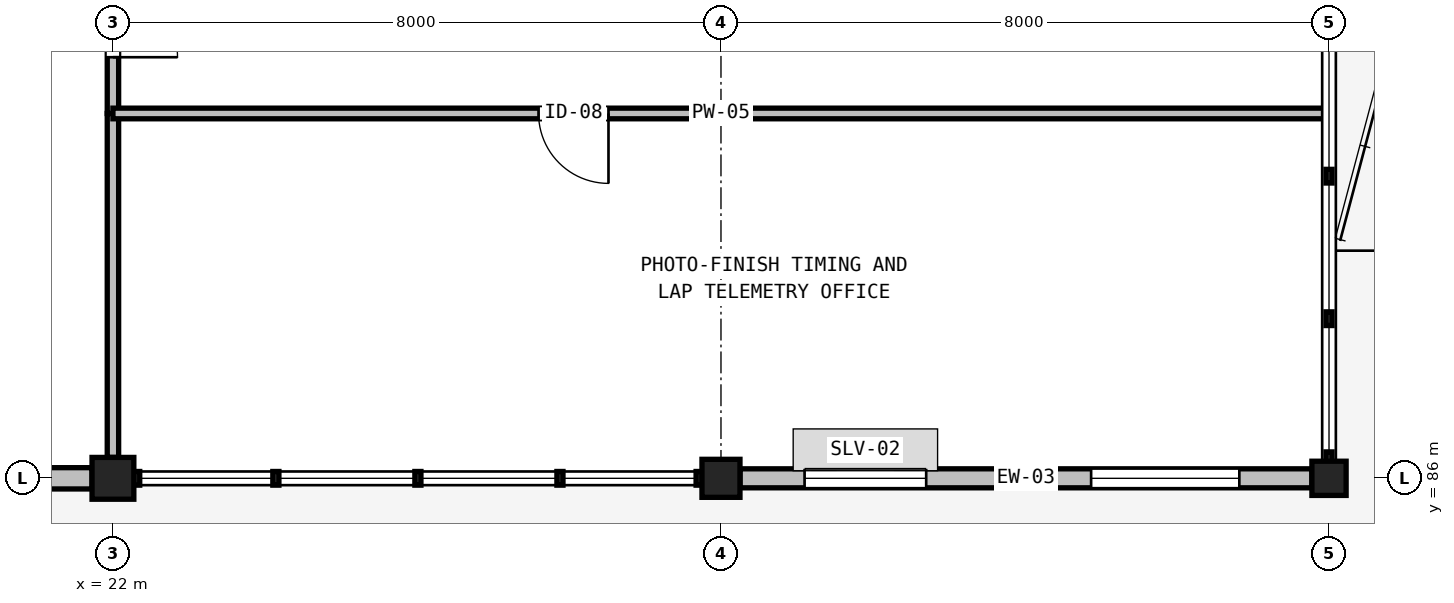
"""IFC4 building model, lengths in metres.
Left out: names, types, materials, properties, quantities, classifications, styles, units other than length and angle.
Written with IfcOpenShell. Run it as: python <this file> out.ifc"""

import sys

from ifc_helpers import new_model, si_unit, direction, frame, frame_2d, origin, origin_2d, place, context, subcontext, project, spatial, rectangle, extrude, element, fill, save


model = new_model("IFC4")
c1 = context("Model", 3, precision=1e-05, world=origin(), true_north=direction((0.0, 1.0)))
c2 = subcontext(c1, "Body", "Model", "MODEL_VIEW")
j1 = project(units=[si_unit("LENGTHUNIT", "METRE"), si_unit("PLANEANGLEUNIT", "RADIAN")], contexts=[c1])
p1 = place(None, origin())
s1 = spatial("IfcSite", under=j1, at=p1, CompositionType="ELEMENT")
p2 = place(p1, origin())
s2 = spatial("IfcBuilding", under=s1, at=p2, CompositionType="ELEMENT")
p3 = place(p2, frame((0.0, 0.0, 19.2)))
s3 = spatial("IfcBuildingStorey", under=s2, at=p3, CompositionType="ELEMENT", Elevation=19.2)
p4 = place(p3, frame((22.0, 86.0, 0.0), z_axis=(0.0, 0.0, 1.0), x_axis=(1.0, 0.0, 0.0)))
e1 = element("IfcColumn", 1, at=p4, inside=s3, PredefinedType="COLUMN", context=c2, shape_type="SweptSolid", body=[
    extrude(rectangle(XDim=0.55, YDim=0.55, at=origin_2d()), origin(), (0.0, 0.0, 1.0), 4.2),
])
p5 = place(p3, frame((30.0, 86.0, 0.0), z_axis=(0.0, 0.0, 1.0), x_axis=(1.0, 0.0, 0.0)))
e2 = element("IfcColumn", 2, at=p5, inside=s3, PredefinedType="COLUMN", context=c2, shape_type="SweptSolid", body=[
    extrude(rectangle(XDim=0.5, YDim=0.5, at=origin_2d()), origin(), (0.0, 0.0, 1.0), 4.2),
])
p6 = place(p3, frame((38.0, 86.0, 0.0), z_axis=(0.0, 0.0, 1.0), x_axis=(1.0, 0.0, 0.0)))
e3 = element("IfcColumn", 3, at=p6, inside=s3, PredefinedType="COLUMN", context=c2, shape_type="SweptSolid", body=[
    extrude(rectangle(XDim=0.45, YDim=0.45, at=origin_2d()), origin(), (0.0, 0.0, 1.0), 4.2),
])
p7 = place(p3, frame((14.225, 86.0, 0.0), z_axis=(0.0, 0.0, 1.0), x_axis=(1.0, 0.0, 0.0)))
e4 = element("IfcWall", 4, at=p7, inside=s3, PredefinedType="SOLIDWALL", context=c2, shape_type="SweptSolid", body=[
    extrude(rectangle(XDim=7.5, YDim=0.28, at=frame_2d((3.75, 0.0))), origin(), (0.0, 0.0, 1.0), 3.07),
])
p8 = place(p7, frame((1.35, 0.0, 1.15)))
e5 = element("IfcOpeningElement", 5, at=p8, cuts=e4, PredefinedType="OPENING", context=c2, shape_type="SweptSolid", body=[
    extrude(rectangle(XDim=4.8, YDim=1.4, at=frame_2d((2.4, 0.7))), frame((0.0, 0.15, 0.0), z_axis=(0.0, -1.0, 0.0), x_axis=(1.0, 0.0, 0.0)), (0.0, 0.0, 1.0), 0.3),
])
p9 = place(p3, frame((30.25, 86.0, 0.0), z_axis=(0.0, 0.0, 1.0), x_axis=(1.0, 0.0, 0.0)))
e6 = element("IfcWall", 6, at=p9, inside=s3, PredefinedType="SOLIDWALL", context=c2, shape_type="SweptSolid", body=[
    extrude(rectangle(XDim=7.525, YDim=0.25, at=frame_2d((3.762, 0.0))), origin(), (0.0, 0.0, 1.0), 3.37),
])
p10 = place(p9, frame((0.85, 0.0, 0.55)))
e7 = element("IfcOpeningElement", 7, at=p10, cuts=e6, PredefinedType="OPENING", context=c2, shape_type="SweptSolid", body=[
    extrude(rectangle(XDim=1.6, YDim=2.0, at=frame_2d((0.8, 1.0))), frame((0.0, 0.135, 0.0), z_axis=(0.0, -1.0, 0.0), x_axis=(1.0, 0.0, 0.0)), (0.0, 0.0, 1.0), 0.27),
])
p11 = place(p9, frame((4.62, 0.0, 0.7)))
e8 = element("IfcOpeningElement", 8, at=p11, cuts=e6, PredefinedType="OPENING", context=c2, shape_type="SweptSolid", body=[
    extrude(rectangle(XDim=1.95, YDim=1.85, at=frame_2d((0.975, 0.925))), frame((0.0, 0.135, 0.0), z_axis=(0.0, -1.0, 0.0), x_axis=(1.0, 0.0, 0.0)), (0.0, 0.0, 1.0), 0.27),
])
p12 = place(p3, frame((22.0, 86.275, 0.0), z_axis=(0.0, 0.0, 1.0), x_axis=(0.0, 1.0, 0.0)))
e9 = element("IfcWall", 9, at=p12, inside=s3, PredefinedType="PARTITIONING", context=c2, shape_type="SweptSolid", body=[
    extrude(rectangle(XDim=4.525, YDim=0.15, at=frame_2d((2.263, 0.0))), origin(), (0.0, 0.0, 1.0), 3.07),
])
p13 = place(p3, frame((22.0, 90.8, 0.0), z_axis=(0.0, 0.0, 1.0), x_axis=(0.0, 1.0, 0.0)))
e10 = element("IfcWall", 10, at=p13, inside=s3, PredefinedType="PARTITIONING", context=c2, shape_type="SweptSolid", body=[
    extrude(rectangle(XDim=2.95, YDim=0.15, at=frame_2d((1.475, 0.0))), origin(), (0.0, 0.0, 1.0), 3.07),
])
p14 = place(p13, frame((0.74, 0.0, 0.0)))
e11 = element("IfcOpeningElement", 11, at=p14, cuts=e10, PredefinedType="OPENING", context=c2, shape_type="SweptSolid", body=[
    extrude(rectangle(XDim=1.7, YDim=2.25, at=frame_2d((0.85, 1.125))), frame((0.0, 0.085, 0.0), z_axis=(0.0, -1.0, 0.0), x_axis=(1.0, 0.0, 0.0)), (0.0, 0.0, 1.0), 0.17),
])
p15 = place(p3, frame((22.0, 90.8, 0.0), z_axis=(0.0, 0.0, 1.0), x_axis=(1.0, 0.0, 0.0)))
e12 = element("IfcWall", 12, at=p15, inside=s3, PredefinedType="PARTITIONING", context=c2, shape_type="SweptSolid", body=[
    extrude(rectangle(XDim=16.0, YDim=0.14, at=frame_2d((8.0, 0.0))), origin(), (0.0, 0.0, 1.0), 3.9),
])
p16 = place(p15, frame((5.6, 0.0, 0.0)))
e13 = element("IfcOpeningElement", 13, at=p16, cuts=e12, PredefinedType="OPENING", context=c2, shape_type="SweptSolid", body=[
    extrude(rectangle(XDim=0.92, YDim=2.12, at=frame_2d((0.46, 1.06))), frame((0.0, 0.08, 0.0), z_axis=(0.0, -1.0, 0.0), x_axis=(1.0, 0.0, 0.0)), (0.0, 0.0, 1.0), 0.16),
])
p17 = place(p10, origin())
e14 = element("IfcWindow", 14, at=p17, inside=s3, PartitioningType="SINGLE_PANEL", PredefinedType="WINDOW", context=c2, shape_type="SweptSolid", body=[
    extrude(rectangle(XDim=1.6, YDim=2.0, at=frame_2d((0.8, 1.0))), frame((0.0, 0.03, 0.0), z_axis=(0.0, -1.0, 0.0), x_axis=(1.0, 0.0, 0.0)), (0.0, 0.0, 1.0), 0.06),
])
fill(e7, e14)
p18 = place(p11, origin())
e15 = element("IfcWindow", 15, at=p18, inside=s3, PartitioningType="SINGLE_PANEL", PredefinedType="WINDOW", context=c2, shape_type="SweptSolid", body=[
    extrude(rectangle(XDim=1.95, YDim=1.85, at=frame_2d((0.975, 0.925))), frame((0.0, 0.03, 0.0), z_axis=(0.0, -1.0, 0.0), x_axis=(1.0, 0.0, 0.0)), (0.0, 0.0, 1.0), 0.06),
])
fill(e8, e15)
p19 = place(p14, frame((1.7, 0.0, 0.0), z_axis=(0.0, 0.0, 1.0), x_axis=(-1.0, 0.0, 0.0)))
e16 = element("IfcDoor", 16, at=p19, inside=s3, OperationType="DOUBLE_DOOR_SINGLE_SWING", PredefinedType="DOOR", context=c2, shape_type="SweptSolid", body=[
    extrude(rectangle(XDim=1.7, YDim=2.25, at=frame_2d((0.85, 1.125))), frame((0.0, 0.025, 0.0), z_axis=(0.0, -1.0, 0.0), x_axis=(1.0, 0.0, 0.0)), (0.0, 0.0, 1.0), 0.05),
])
fill(e11, e16)
p20 = place(p16, frame((0.92, 0.0, 0.0), z_axis=(0.0, 0.0, 1.0), x_axis=(-1.0, 0.0, 0.0)))
e17 = element("IfcDoor", 17, at=p20, inside=s3, OperationType="SINGLE_SWING_RIGHT", PredefinedType="DOOR", context=c2, shape_type="SweptSolid", body=[
    extrude(rectangle(XDim=0.92, YDim=2.12, at=frame_2d((0.46, 1.06))), frame((0.0, 0.025, 0.0), z_axis=(0.0, -1.0, 0.0), x_axis=(1.0, 0.0, 0.0)), (0.0, 0.0, 1.0), 0.05),
])
fill(e13, e17)
save(model, sys.argv[1])
